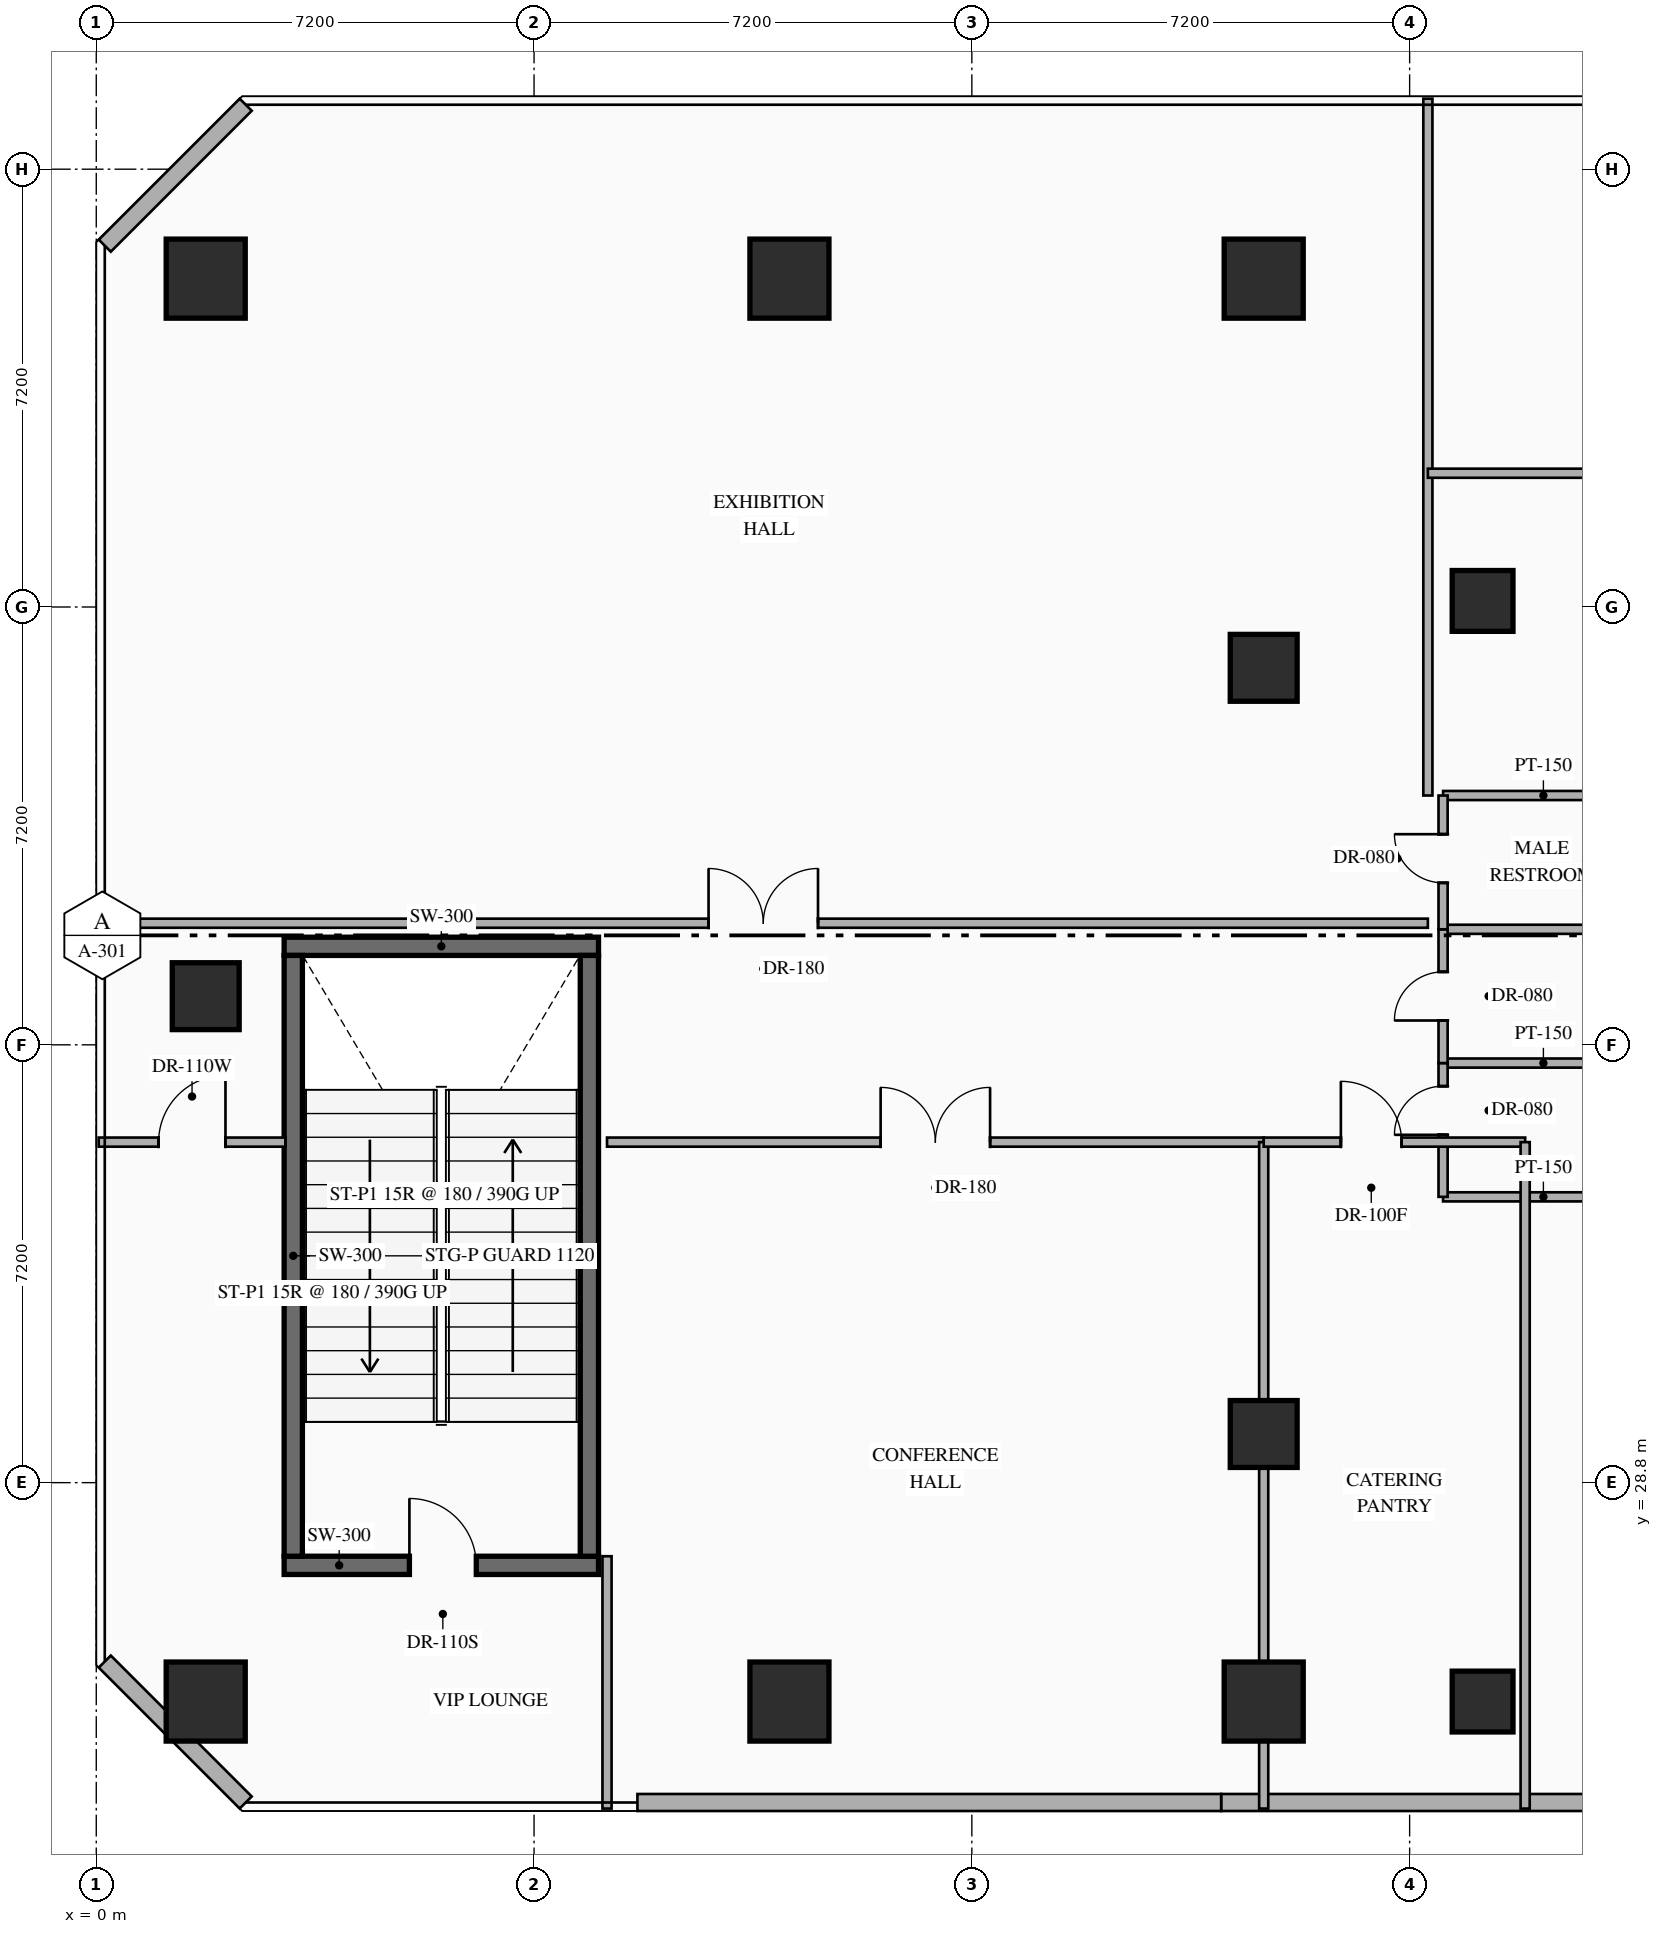
"""IFC4 building model, lengths in metres.
Left out: names, types, materials, properties, quantities, classifications, styles, units other than length and angle.
Written with IfcOpenShell. Run it as: python <this file> out.ifc"""

import sys

from ifc_helpers import new_model, si_unit, direction, frame, frame_2d, origin, origin_2d, place, context, subcontext, project, spatial, rectangle, hollow_rectangle, extrude, element, fill, save


model = new_model("IFC4")
c1 = context("Model", 3, precision=1e-05, world=origin(), true_north=direction((0.0, 1.0)))
c2 = subcontext(c1, "Body", "Model", "MODEL_VIEW")
j1 = project(units=[si_unit("LENGTHUNIT", "METRE"), si_unit("PLANEANGLEUNIT", "RADIAN")], contexts=[c1])
p1 = place(None, origin())
s1 = spatial("IfcSite", under=j1, at=p1, CompositionType="ELEMENT")
p2 = place(p1, origin())
s2 = spatial("IfcBuilding", under=s1, at=p2, CompositionType="ELEMENT")
p3 = place(p2, frame((0.0, 0.0, 5.4)))
s3 = spatial("IfcBuildingStorey", under=s2, at=p3, CompositionType="ELEMENT", Elevation=5.4)
p4 = place(p3, frame((3.09, 27.44, 0.0), z_axis=(0.0, 0.0, 1.0), x_axis=(1.0, 0.0, 0.0)))
e1 = element("IfcWall", 1, at=p4, inside=s3, PredefinedType="SHEAR", context=c2, shape_type="SweptSolid", body=[
    extrude(rectangle(XDim=5.17, YDim=0.3, at=frame_2d((2.585, 0.0))), origin(), (0.0, 0.0, 1.0), 5.4),
])
p5 = place(p4, frame((2.06, 0.0, 0.0)))
e2 = element("IfcOpeningElement", 2, at=p5, cuts=e1, PredefinedType="OPENING", context=c2, shape_type="SweptSolid", body=[
    extrude(rectangle(XDim=1.1, YDim=2.2, at=frame_2d((0.55, 1.1))), frame((0.0, 0.16, 0.0), z_axis=(0.0, -1.0, 0.0), x_axis=(1.0, 0.0, 0.0)), (0.0, 0.0, 1.0), 0.32),
])
p6 = place(p3, frame((3.09, 37.62, 0.0), z_axis=(0.0, 0.0, 1.0), x_axis=(1.0, 0.0, 0.0)))
e3 = element("IfcWall", 3, at=p6, inside=s3, PredefinedType="SHEAR", context=c2, shape_type="SweptSolid", body=[
    extrude(rectangle(XDim=5.17, YDim=0.3, at=frame_2d((2.585, 0.0))), origin(), (0.0, 0.0, 1.0), 5.4),
])
for number, where, z_axis, x_axis in (
    (4, (3.24, 27.59, 0.0), (0.0, 0.0, 1.0), (0.0, 1.0, 0.0)),
    (5, (8.11, 27.59, 0.0), (0.0, 0.0, 1.0), (0.0, 1.0, 0.0)),
):
    element("IfcWall", number, at=place(p3, frame(where, z_axis=z_axis, x_axis=x_axis)), inside=s3, PredefinedType="SHEAR", context=c2, shape_type="SweptSolid", body=[
        extrude(rectangle(XDim=9.88, YDim=0.3, at=frame_2d((4.94, 0.0))), origin(), (0.0, 0.0, 1.0), 5.4),
    ])
for number, where, z_axis, x_axis in (
    (6, (1.8, 25.2, 0.0), (0.0, 0.0, 1.0), (1.0, 0.0, 0.0)),
    (7, (1.8, 48.6, 0.0), (0.0, 0.0, 1.0), (1.0, 0.0, 0.0)),
):
    element("IfcColumn", number, at=place(p3, frame(where, z_axis=z_axis, x_axis=x_axis)), inside=s3, PredefinedType="COLUMN", context=c2, shape_type="SweptSolid", body=[
        extrude(rectangle(XDim=1.3, YDim=1.3, at=origin_2d()), origin(), (0.0, 0.0, 1.0), 5.4),
    ])
p7 = place(p3, frame((1.8, 36.8, 0.0), z_axis=(0.0, 0.0, 1.0), x_axis=(1.0, 0.0, 0.0)))
e8 = element("IfcColumn", 8, at=p7, inside=s3, PredefinedType="COLUMN", context=c2, shape_type="SweptSolid", body=[
    extrude(hollow_rectangle(XDim=1.1, YDim=1.1, WallThickness=0.04, at=origin_2d()), origin(), (0.0, 0.0, 1.0), 5.4),
])
for number, where, z_axis, x_axis in (
    (9, (11.4, 25.2, 0.0), (0.0, 0.0, 1.0), (1.0, 0.0, 0.0)),
    (10, (11.4, 48.6, 0.0), (0.0, 0.0, 1.0), (1.0, 0.0, 0.0)),
    (11, (19.2, 48.6, 0.0), (0.0, 0.0, 1.0), (1.0, 0.0, 0.0)),
    (12, (19.2, 25.2, 0.0), (0.0, 0.0, 1.0), (1.0, 0.0, 0.0)),
):
    element("IfcColumn", number, at=place(p3, frame(where, z_axis=z_axis, x_axis=x_axis)), inside=s3, PredefinedType="COLUMN", context=c2, shape_type="SweptSolid", body=[
        extrude(rectangle(XDim=1.3, YDim=1.3, at=origin_2d()), origin(), (0.0, 0.0, 1.0), 5.4),
    ])
for number, where, z_axis, x_axis in (
    (13, (19.2, 29.6, 0.0), (0.0, 0.0, 1.0), (1.0, 0.0, 0.0)),
    (14, (19.2, 42.2, 0.0), (0.0, 0.0, 1.0), (1.0, 0.0, 0.0)),
):
    element("IfcColumn", number, at=place(p3, frame(where, z_axis=z_axis, x_axis=x_axis)), inside=s3, PredefinedType="COLUMN", context=c2, shape_type="SweptSolid", body=[
        extrude(hollow_rectangle(XDim=1.1, YDim=1.1, WallThickness=0.04, at=origin_2d()), origin(), (0.0, 0.0, 1.0), 5.4),
    ])
for number, where, z_axis, x_axis in (
    (15, (22.8, 25.2, 0.0), (0.0, 0.0, 1.0), (1.0, 0.0, 0.0)),
    (16, (22.8, 43.3, 0.0), (0.0, 0.0, 1.0), (1.0, 0.0, 0.0)),
):
    element("IfcColumn", number, at=place(p3, frame(where, z_axis=z_axis, x_axis=x_axis)), inside=s3, PredefinedType="COLUMN", context=c2, shape_type="SweptSolid", body=[
        extrude(hollow_rectangle(XDim=1.0, YDim=1.0, WallThickness=0.038, at=origin_2d()), origin(), (0.0, 0.0, 1.0), 5.4),
    ])
p8 = place(p3, frame((25.247, 23.54, 0.0), z_axis=(0.0, 0.0, 1.0), x_axis=(-1.0, 0.0, 0.0)))
e17 = element("IfcWall", 17, at=p8, inside=s3, PredefinedType="STANDARD", context=c2, shape_type="SweptSolid", body=[
    extrude(rectangle(XDim=6.747, YDim=0.28, at=frame_2d((3.374, 0.0))), origin(), (0.0, 0.0, 1.0), 5.1),
])
p9 = place(p3, frame((18.5, 23.54, 0.0), z_axis=(0.0, 0.0, 1.0), x_axis=(-1.0, 0.0, 0.0)))
e18 = element("IfcWall", 18, at=p9, inside=s3, PredefinedType="STANDARD", context=c2, shape_type="SweptSolid", body=[
    extrude(rectangle(XDim=9.6, YDim=0.28, at=frame_2d((4.8, 0.0))), origin(), (0.0, 0.0, 1.0), 5.1),
])
for number, where, z_axis, x_axis in (
    (19, (2.458, 23.54, 0.0), (0.0, 0.0, 1.0), (-0.707, 0.707, 0.0)),
    (20, (0.14, 49.142, 0.0), (0.0, 0.0, 1.0), (0.707, 0.707, 0.0)),
):
    element("IfcWall", number, at=place(p3, frame(where, z_axis=z_axis, x_axis=x_axis)), inside=s3, PredefinedType="STANDARD", context=c2, shape_type="SweptSolid", body=[
        extrude(rectangle(XDim=3.278, YDim=0.28, at=frame_2d((1.639, 0.0))), origin(), (0.0, 0.0, 1.0), 5.1),
    ])
for number, where, z_axis, x_axis in (
    (21, (22.15, 33.5, 0.0), (0.0, 0.0, 1.0), (1.0, 0.0, 0.0)),
    (22, (22.15, 40.1, 0.0), (0.0, 0.0, 1.0), (1.0, 0.0, 0.0)),
    (23, (22.15, 35.7, 0.0), (0.0, 0.0, 1.0), (1.0, 0.0, 0.0)),
    (24, (22.15, 37.9, 0.0), (0.0, 0.0, 1.0), (1.0, 0.0, 0.0)),
):
    element("IfcWall", number, at=place(p3, frame(where, z_axis=z_axis, x_axis=x_axis)), inside=s3, PredefinedType="PARTITIONING", context=c2, shape_type="SweptSolid", body=[
        extrude(rectangle(XDim=3.3, YDim=0.15, at=frame_2d((1.65, 0.0))), origin(), (0.0, 0.0, 1.0), 5.1),
    ])
p10 = place(p3, frame((22.15, 33.5, 0.0), z_axis=(0.0, 0.0, 1.0), x_axis=(0.0, 1.0, 0.0)))
e25 = element("IfcWall", 25, at=p10, inside=s3, PredefinedType="PARTITIONING", context=c2, shape_type="SweptSolid", body=[
    extrude(rectangle(XDim=2.2, YDim=0.15, at=frame_2d((1.1, 0.0))), origin(), (0.0, 0.0, 1.0), 5.1),
])
p11 = place(p10, frame((1.02, 0.0, 0.0)))
e26 = element("IfcOpeningElement", 26, at=p11, cuts=e25, PredefinedType="OPENING", context=c2, shape_type="SweptSolid", body=[
    extrude(rectangle(XDim=0.8, YDim=2.06, at=frame_2d((0.4, 1.03))), frame((0.0, 0.085, 0.0), z_axis=(0.0, -1.0, 0.0), x_axis=(1.0, 0.0, 0.0)), (0.0, 0.0, 1.0), 0.17),
])
p12 = place(p3, frame((22.15, 35.7, 0.0), z_axis=(0.0, 0.0, 1.0), x_axis=(0.0, 1.0, 0.0)))
e27 = element("IfcWall", 27, at=p12, inside=s3, PredefinedType="PARTITIONING", context=c2, shape_type="SweptSolid", body=[
    extrude(rectangle(XDim=2.2, YDim=0.15, at=frame_2d((1.1, 0.0))), origin(), (0.0, 0.0, 1.0), 5.1),
])
p13 = place(p12, frame((0.7, 0.0, 0.0)))
e28 = element("IfcOpeningElement", 28, at=p13, cuts=e27, PredefinedType="OPENING", context=c2, shape_type="SweptSolid", body=[
    extrude(rectangle(XDim=0.8, YDim=2.06, at=frame_2d((0.4, 1.03))), frame((0.0, 0.085, 0.0), z_axis=(0.0, -1.0, 0.0), x_axis=(1.0, 0.0, 0.0)), (0.0, 0.0, 1.0), 0.17),
])
p14 = place(p3, frame((22.15, 37.9, 0.0), z_axis=(0.0, 0.0, 1.0), x_axis=(0.0, 1.0, 0.0)))
e29 = element("IfcWall", 29, at=p14, inside=s3, PredefinedType="PARTITIONING", context=c2, shape_type="SweptSolid", body=[
    extrude(rectangle(XDim=2.2, YDim=0.15, at=frame_2d((1.1, 0.0))), origin(), (0.0, 0.0, 1.0), 5.1),
])
p15 = place(p14, frame((0.764, 0.0, 0.0)))
e30 = element("IfcOpeningElement", 30, at=p15, cuts=e29, PredefinedType="OPENING", context=c2, shape_type="SweptSolid", body=[
    extrude(rectangle(XDim=0.8, YDim=2.06, at=frame_2d((0.4, 1.03))), frame((0.0, 0.085, 0.0), z_axis=(0.0, -1.0, 0.0), x_axis=(1.0, 0.0, 0.0)), (0.0, 0.0, 1.0), 0.17),
])
p16 = place(p3, frame((0.04, 38.0, 0.0), z_axis=(0.0, 0.0, 1.0), x_axis=(1.0, 0.0, 0.0)))
e31 = element("IfcWall", 31, at=p16, inside=s3, PredefinedType="PARTITIONING", context=c2, shape_type="SweptSolid", body=[
    extrude(rectangle(XDim=21.86, YDim=0.15, at=frame_2d((10.93, 0.0))), origin(), (0.0, 0.0, 1.0), 5.1),
])
p17 = place(p16, frame((10.03, 0.0, 0.0)))
e32 = element("IfcOpeningElement", 32, at=p17, cuts=e31, PredefinedType="OPENING", context=c2, shape_type="SweptSolid", body=[
    extrude(rectangle(XDim=1.8, YDim=2.35, at=frame_2d((0.9, 1.175))), frame((0.0, 0.085, 0.0), z_axis=(0.0, -1.0, 0.0), x_axis=(1.0, 0.0, 0.0)), (0.0, 0.0, 1.0), 0.17),
])
p18 = place(p3, frame((21.9, 40.1, 0.0), z_axis=(0.0, 0.0, 1.0), x_axis=(0.0, 1.0, 0.0)))
e33 = element("IfcWall", 33, at=p18, inside=s3, PredefinedType="PARTITIONING", context=c2, shape_type="SweptSolid", body=[
    extrude(rectangle(XDim=11.46, YDim=0.15, at=frame_2d((5.73, 0.0))), origin(), (0.0, 0.0, 1.0), 5.1),
])
p19 = place(p3, frame((0.04, 34.4, 0.0), z_axis=(0.0, 0.0, 1.0), x_axis=(1.0, 0.0, 0.0)))
e34 = element("IfcWall", 34, at=p19, inside=s3, PredefinedType="PARTITIONING", context=c2, shape_type="SweptSolid", body=[
    extrude(rectangle(XDim=3.07, YDim=0.15, at=frame_2d((1.535, 0.0))), origin(), (0.0, 0.0, 1.0), 5.1),
])
p20 = place(p19, frame((0.985, 0.0, 0.0)))
e35 = element("IfcOpeningElement", 35, at=p20, cuts=e34, PredefinedType="OPENING", context=c2, shape_type="SweptSolid", body=[
    extrude(rectangle(XDim=1.1, YDim=2.16, at=frame_2d((0.55, 1.08))), frame((0.0, 0.085, 0.0), z_axis=(0.0, -1.0, 0.0), x_axis=(1.0, 0.0, 0.0)), (0.0, 0.0, 1.0), 0.17),
])
p21 = place(p3, frame((8.4, 23.44, 0.0), z_axis=(0.0, 0.0, 1.0), x_axis=(0.0, 1.0, 0.0)))
e36 = element("IfcWall", 36, at=p21, inside=s3, PredefinedType="PARTITIONING", context=c2, shape_type="SweptSolid", body=[
    extrude(rectangle(XDim=4.15, YDim=0.15, at=frame_2d((2.075, 0.0))), origin(), (0.0, 0.0, 1.0), 5.1),
])
p22 = place(p3, frame((8.4, 34.4, 0.0), z_axis=(0.0, 0.0, 1.0), x_axis=(1.0, 0.0, 0.0)))
e37 = element("IfcWall", 37, at=p22, inside=s3, PredefinedType="PARTITIONING", context=c2, shape_type="SweptSolid", body=[
    extrude(rectangle(XDim=10.8, YDim=0.15, at=frame_2d((5.4, 0.0))), origin(), (0.0, 0.0, 1.0), 5.1),
])
p23 = place(p22, frame((4.5, 0.0, 0.0)))
e38 = element("IfcOpeningElement", 38, at=p23, cuts=e37, PredefinedType="OPENING", context=c2, shape_type="SweptSolid", body=[
    extrude(rectangle(XDim=1.8, YDim=2.35, at=frame_2d((0.9, 1.175))), frame((0.0, 0.085, 0.0), z_axis=(0.0, -1.0, 0.0), x_axis=(1.0, 0.0, 0.0)), (0.0, 0.0, 1.0), 0.17),
])
p24 = place(p3, frame((19.2, 23.44, 0.0), z_axis=(0.0, 0.0, 1.0), x_axis=(0.0, 1.0, 0.0)))
e39 = element("IfcWall", 39, at=p24, inside=s3, PredefinedType="PARTITIONING", context=c2, shape_type="SweptSolid", body=[
    extrude(rectangle(XDim=10.96, YDim=0.15, at=frame_2d((5.48, 0.0))), origin(), (0.0, 0.0, 1.0), 3.895),
])
p25 = place(p3, frame((19.2, 34.4, 0.0), z_axis=(0.0, 0.0, 1.0), x_axis=(1.0, 0.0, 0.0)))
e40 = element("IfcWall", 40, at=p25, inside=s3, PredefinedType="PARTITIONING", context=c2, shape_type="SweptSolid", body=[
    extrude(rectangle(XDim=4.3, YDim=0.15, at=frame_2d((2.15, 0.0))), origin(), (0.0, 0.0, 1.0), 5.1),
])
p26 = place(p25, frame((1.269, 0.0, 0.0)))
e41 = element("IfcOpeningElement", 41, at=p26, cuts=e40, PredefinedType="OPENING", context=c2, shape_type="SweptSolid", body=[
    extrude(rectangle(XDim=1.0, YDim=2.2, at=frame_2d((0.5, 1.1))), frame((0.0, 0.085, 0.0), z_axis=(0.0, -1.0, 0.0), x_axis=(1.0, 0.0, 0.0)), (0.0, 0.0, 1.0), 0.17),
])
p27 = place(p3, frame((23.5, 23.44, 0.0), z_axis=(0.0, 0.0, 1.0), x_axis=(0.0, 1.0, 0.0)))
e42 = element("IfcWall", 42, at=p27, inside=s3, PredefinedType="PARTITIONING", context=c2, shape_type="SweptSolid", body=[
    extrude(rectangle(XDim=10.96, YDim=0.15, at=frame_2d((5.48, 0.0))), origin(), (0.0, 0.0, 1.0), 5.1),
])
p28 = place(p3, frame((21.9, 45.4, 0.0), z_axis=(0.0, 0.0, 1.0), x_axis=(1.0, 0.0, 0.0)))
e43 = element("IfcWall", 43, at=p28, inside=s3, PredefinedType="PARTITIONING", context=c2, shape_type="SweptSolid", body=[
    extrude(rectangle(XDim=23.06, YDim=0.15, at=frame_2d((11.53, 0.0))), origin(), (0.0, 0.0, 1.0), 5.1),
])
p29 = place(p28, frame((14.16, 0.0, 0.0)))
e44 = element("IfcOpeningElement", 44, at=p29, cuts=e43, PredefinedType="OPENING", context=c2, shape_type="SweptSolid", body=[
    extrude(rectangle(XDim=1.1, YDim=2.16, at=frame_2d((0.55, 1.08))), frame((0.0, 0.085, 0.0), z_axis=(0.0, -1.0, 0.0), x_axis=(1.0, 0.0, 0.0)), (0.0, 0.0, 1.0), 0.17),
])
p30 = place(p5, origin())
e45 = element("IfcDoor", 45, at=p30, inside=s3, OperationType="SINGLE_SWING_LEFT", PredefinedType="DOOR", context=c2, shape_type="SweptSolid", body=[
    extrude(rectangle(XDim=1.1, YDim=2.2, at=frame_2d((0.55, 1.1))), frame((0.0, 0.025, 0.0), z_axis=(0.0, -1.0, 0.0), x_axis=(1.0, 0.0, 0.0)), (0.0, 0.0, 1.0), 0.05),
])
fill(e2, e45)
p31 = place(p11, origin())
e46 = element("IfcDoor", 46, at=p31, inside=s3, OperationType="SINGLE_SWING_LEFT", PredefinedType="DOOR", context=c2, shape_type="SweptSolid", body=[
    extrude(rectangle(XDim=0.8, YDim=2.06, at=frame_2d((0.4, 1.03))), frame((0.0, 0.025, 0.0), z_axis=(0.0, -1.0, 0.0), x_axis=(1.0, 0.0, 0.0)), (0.0, 0.0, 1.0), 0.05),
])
fill(e26, e46)
p32 = place(p13, origin())
e47 = element("IfcDoor", 47, at=p32, inside=s3, OperationType="SINGLE_SWING_LEFT", PredefinedType="DOOR", context=c2, shape_type="SweptSolid", body=[
    extrude(rectangle(XDim=0.8, YDim=2.06, at=frame_2d((0.4, 1.03))), frame((0.0, 0.025, 0.0), z_axis=(0.0, -1.0, 0.0), x_axis=(1.0, 0.0, 0.0)), (0.0, 0.0, 1.0), 0.05),
])
fill(e28, e47)
p33 = place(p15, origin())
e48 = element("IfcDoor", 48, at=p33, inside=s3, OperationType="SINGLE_SWING_RIGHT", PredefinedType="DOOR", context=c2, shape_type="SweptSolid", body=[
    extrude(rectangle(XDim=0.8, YDim=2.06, at=frame_2d((0.4, 1.03))), frame((0.0, 0.025, 0.0), z_axis=(0.0, -1.0, 0.0), x_axis=(1.0, 0.0, 0.0)), (0.0, 0.0, 1.0), 0.05),
])
fill(e30, e48)
p34 = place(p17, origin())
e49 = element("IfcDoor", 49, at=p34, inside=s3, OperationType="DOUBLE_DOOR_SINGLE_SWING", PredefinedType="DOOR", context=c2, shape_type="SweptSolid", body=[
    extrude(rectangle(XDim=1.8, YDim=2.35, at=frame_2d((0.9, 1.175))), frame((0.0, 0.025, 0.0), z_axis=(0.0, -1.0, 0.0), x_axis=(1.0, 0.0, 0.0)), (0.0, 0.0, 1.0), 0.05),
])
fill(e32, e49)
p35 = place(p20, origin())
e50 = element("IfcDoor", 50, at=p35, inside=s3, OperationType="SINGLE_SWING_RIGHT", PredefinedType="DOOR", context=c2, shape_type="SweptSolid", body=[
    extrude(rectangle(XDim=1.1, YDim=2.16, at=frame_2d((0.55, 1.08))), frame((0.0, 0.025, 0.0), z_axis=(0.0, -1.0, 0.0), x_axis=(1.0, 0.0, 0.0)), (0.0, 0.0, 1.0), 0.05),
])
fill(e35, e50)
p36 = place(p23, origin())
e51 = element("IfcDoor", 51, at=p36, inside=s3, OperationType="DOUBLE_DOOR_SINGLE_SWING", PredefinedType="DOOR", context=c2, shape_type="SweptSolid", body=[
    extrude(rectangle(XDim=1.8, YDim=2.35, at=frame_2d((0.9, 1.175))), frame((0.0, 0.025, 0.0), z_axis=(0.0, -1.0, 0.0), x_axis=(1.0, 0.0, 0.0)), (0.0, 0.0, 1.0), 0.05),
])
fill(e38, e51)
p37 = place(p26, origin())
e52 = element("IfcDoor", 52, at=p37, inside=s3, OperationType="SINGLE_SWING_LEFT", PredefinedType="DOOR", context=c2, shape_type="SweptSolid", body=[
    extrude(rectangle(XDim=1.0, YDim=2.2, at=frame_2d((0.5, 1.1))), frame((0.0, 0.025, 0.0), z_axis=(0.0, -1.0, 0.0), x_axis=(1.0, 0.0, 0.0)), (0.0, 0.0, 1.0), 0.05),
])
fill(e41, e52)
save(model, sys.argv[1])
